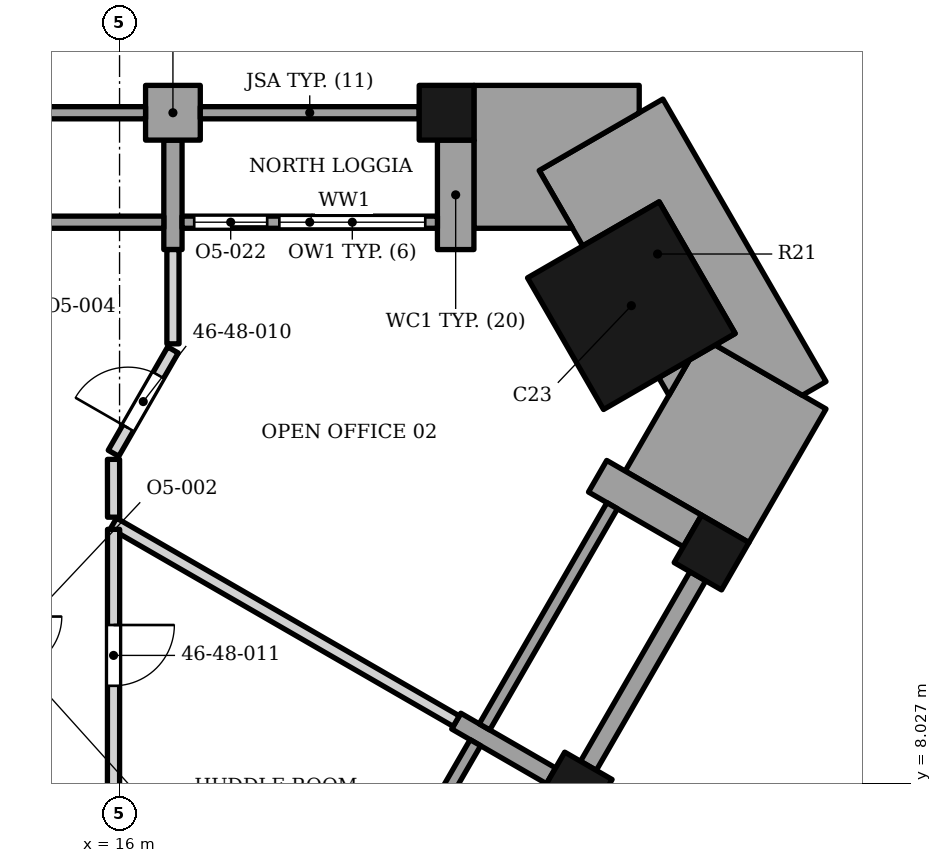
"""IFC4 building model, lengths in metres.
Left out: names, types, materials, properties, quantities, classifications, styles, units other than length and angle.
Written with IfcOpenShell. Run it as: python <this file> out.ifc"""

import sys

from ifc_helpers import new_model, si_unit, direction, frame, frame_2d, origin, origin_2d, place, context, subcontext, project, spatial, polyline, rectangle, outline, extrude, element, fill, save


model = new_model("IFC4")
c1 = context("Model", 3, precision=1e-05, world=origin(), true_north=direction((0.0, 1.0)))
c2 = subcontext(c1, "Body", "Model", "MODEL_VIEW")
j1 = project(units=[si_unit("LENGTHUNIT", "METRE"), si_unit("PLANEANGLEUNIT", "RADIAN")], contexts=[c1])
p1 = place(None, origin())
s1 = spatial("IfcSite", under=j1, at=p1, CompositionType="ELEMENT")
p2 = place(p1, origin())
s2 = spatial("IfcBuilding", under=s1, at=p2, CompositionType="ELEMENT")
p3 = place(p2, frame((0.0, 0.0, 196.4)))
s3 = spatial("IfcBuildingStorey", under=s2, at=p3, CompositionType="ELEMENT", Elevation=196.4)
p4 = place(p3, frame((24.417, 15.88, 0.0), z_axis=(0.0, 0.0, 1.0), x_axis=(-0.866025377604, -0.500000045345, 0.0)))
e1 = element("IfcColumn", 1, at=p4, inside=s3, PredefinedType="COLUMN", context=c2, shape_type="SweptSolid", body=[
    extrude(rectangle(XDim=2.5, YDim=2.5, at=origin_2d()), origin(), (0.0, 0.0, 1.0), 3.9),
])
for number, where, z_axis, x_axis in (
    (2, (23.486, 7.923, 0.0), (0.0, 0.0, 1.0), (0.5, 0.866, 0.0)),
    (3, (25.736, 11.82, 0.0), (0.0, 0.0, 1.0), (0.5, 0.866, 0.0)),
    (4, (21.378, 19.053, 0.0), (0.0, 0.0, 1.0), (-1.0, 0.0, 0.0)),
):
    element("IfcColumn", number, at=place(p3, frame(where, z_axis=z_axis, x_axis=x_axis)), inside=s3, PredefinedType="COLUMN", context=c2, shape_type="SweptSolid", body=[
        extrude(rectangle(XDim=0.9, YDim=0.9, at=origin_2d()), origin(), (0.0, 0.0, 1.0), 3.9),
    ])
p5 = place(p3, frame((23.096, 8.148, 0.0), z_axis=(0.0, 0.0, 1.0), x_axis=(-0.866047807691, 0.499961193289, 0.0)))
e5 = element("IfcWall", 5, at=p5, inside=s3, PredefinedType="SOLIDWALL", context=c2, shape_type="SweptSolid", body=[
    extrude(rectangle(XDim=1.8, YDim=0.3, at=frame_2d((0.9, 0.0))), origin(), (0.0, 0.0, 1.0), 2.95),
])
p6 = place(p3, frame((25.421, 12.175, 0.0), z_axis=(0.0, 0.0, 1.0), x_axis=(-0.865989075817, 0.500062916607, 0.0)))
e6 = element("IfcWall", 6, at=p6, inside=s3, PredefinedType="SOLIDWALL", context=c2, shape_type="SweptSolid", body=[
    extrude(rectangle(XDim=1.8, YDim=0.6, at=frame_2d((0.9, 0.0))), origin(), (0.0, 0.0, 1.0), 3.0),
])
p7 = place(p3, frame((19.752, 5.056, 0.0), z_axis=(0.0, 0.0, 1.0), x_axis=(0.500027713859, 0.866009402589, 0.0)))
e7 = element("IfcWall", 7, at=p7, inside=s3, PredefinedType="ELEMENTEDWALL", context=c2, shape_type="SweptSolid", body=[
    extrude(rectangle(XDim=4.2, YDim=0.2, at=frame_2d((2.1, 0.0))), origin(), (0.0, 0.0, 1.0), 2.95),
])
p8 = place(p3, frame((23.711, 8.313, 0.0), z_axis=(0.0, 0.0, 1.0), x_axis=(0.500012057535, 0.866018442252, 0.0)))
e8 = element("IfcWall", 8, at=p8, inside=s3, PredefinedType="SOLIDWALL", context=c2, shape_type="SweptSolid", body=[
    extrude(rectangle(XDim=3.6, YDim=0.3, at=frame_2d((1.8, 0.0))), origin(), (0.0, 0.0, 1.0), 3.0),
])
p9 = place(p3, frame((22.002, 8.953, 0.0), z_axis=(0.0, 0.0, 1.0), x_axis=(0.500002543286, 0.866023935413, 0.0)))
e9 = element("IfcWall", 9, at=p9, inside=s3, PredefinedType="ELEMENTEDWALL", context=c2, shape_type="SweptSolid", body=[
    extrude(rectangle(XDim=4.2, YDim=0.2, at=frame_2d((2.1, 0.0))), origin(), (0.0, 0.0, 1.0), 3.0),
])
p10 = place(p3, origin())
e10 = element("IfcWall", 10, at=p10, inside=s3, PredefinedType="SOLIDWALL", context=c2, shape_type="SweptSolid", body=[
    extrude(outline(polyline([(21.828, 16.802), (21.828, 18.603), (21.228, 18.603), (21.228, 16.802), (21.828, 16.802)])), origin(), (0.0, 0.0, 1.0), 3.0),
])
p11 = place(p3, origin())
e11 = element("IfcWall", 11, at=p11, inside=s3, PredefinedType="SOLIDWALL", context=c2, shape_type="SweptSolid", body=[
    extrude(outline(polyline([(17.328, 19.502), (16.428, 19.502), (16.428, 18.603), (17.328, 18.603), (17.328, 19.502)])), origin(), (0.0, 0.0, 1.0), 3.0),
])
p12 = place(p3, origin())
e12 = element("IfcWall", 12, at=p12, inside=s3, PredefinedType="SOLIDWALL", context=c2, shape_type="SweptSolid", body=[
    extrude(outline(polyline([(17.028, 18.603), (16.728, 18.603), (16.728, 16.802), (17.028, 16.802), (17.028, 18.603)])), origin(), (0.0, 0.0, 1.0), 3.0),
])
p13 = place(p3, frame((20.928, 19.052, 0.0), z_axis=(0.0, 0.0, 1.0), x_axis=(-1.0, 0.0, 0.0)))
e13 = element("IfcWall", 13, at=p13, inside=s3, PredefinedType="SOLIDWALL", context=c2, shape_type="SweptSolid", body=[
    extrude(rectangle(XDim=3.6, YDim=0.2, at=frame_2d((1.8, 0.0))), origin(), (0.0, 0.0, 1.0), 3.0),
])
p14 = place(p3, frame((21.228, 17.252, 0.0), z_axis=(0.0, 0.0, 1.0), x_axis=(-1.0, 0.0, 0.0)))
e14 = element("IfcWall", 14, at=p14, inside=s3, PredefinedType="ELEMENTEDWALL", context=c2, shape_type="SweptSolid", body=[
    extrude(rectangle(XDim=4.2, YDim=0.2, at=frame_2d((2.1, 0.0))), origin(), (0.0, 0.0, 1.0), 3.0),
])
p15 = place(p14, frame((0.2, 0.0, 0.45)))
e15 = element("IfcOpeningElement", 15, at=p15, cuts=e14, PredefinedType="OPENING", context=c2, shape_type="SweptSolid", body=[
    extrude(rectangle(XDim=2.4, YDim=2.25, at=frame_2d((1.2, 1.125))), frame((0.0, 0.11, 0.0), z_axis=(0.0, -1.0, 0.0), x_axis=(1.0, 0.0, 0.0)), (0.0, 0.0, 1.0), 0.22),
])
p16 = place(p14, frame((2.8, 0.0, 0.0)))
e16 = element("IfcOpeningElement", 16, at=p16, cuts=e14, PredefinedType="OPENING", context=c2, shape_type="SweptSolid", body=[
    extrude(rectangle(XDim=1.2, YDim=2.7, at=frame_2d((0.6, 1.35))), frame((0.0, 0.11, 0.0), z_axis=(0.0, -1.0, 0.0), x_axis=(1.0, 0.0, 0.0)), (0.0, 0.0, 1.0), 0.22),
])
p17 = place(p3, origin())
e17 = element("IfcWall", 17, at=p17, inside=s3, PredefinedType="SOLIDWALL", context=c2, shape_type="SweptSolid", body=[
    extrude(outline(polyline([(16.428, 19.153), (12.828, 19.153), (12.828, 19.052), (14.4, 19.052), (14.4, 18.953), (16.428, 18.953), (16.428, 19.153)])), origin(), (0.0, 0.0, 1.0), 3.0),
])
p18 = place(p3, frame((16.728, 17.252, 0.0), z_axis=(0.0, 0.0, 1.0), x_axis=(-1.0, 0.0, 0.0)))
e18 = element("IfcWall", 18, at=p18, inside=s3, PredefinedType="ELEMENTEDWALL", context=c2, shape_type="SweptSolid", body=[
    extrude(rectangle(XDim=4.2, YDim=0.2, at=frame_2d((2.1, 0.0))), origin(), (0.0, 0.0, 1.0), 3.0),
])
p19 = place(p3, origin())
e19 = element("IfcWall", 19, at=p19, inside=s3, PredefinedType="SOLIDWALL", context=c2, shape_type="SweptSolid", body=[
    extrude(outline(polyline([(25.37, 14.987), (24.315, 13.16), (26.351, 11.985), (27.619, 14.181), (25.797, 15.233), (25.37, 14.987)])), origin(), (0.0, 0.0, 1.0), 3.0),
])
p20 = place(p3, origin())
e20 = element("IfcWall", 20, at=p20, inside=s3, PredefinedType="SOLIDWALL", context=c2, shape_type="SweptSolid", body=[
    extrude(outline(polyline([(25.035, 14.406), (25.37, 14.987), (24.867, 14.697), (25.035, 14.406)])), origin(), (0.0, 0.0, 1.0), 3.0),
])
p21 = place(p3, origin())
e21 = element("IfcWall", 21, at=p21, inside=s3, PredefinedType="SOLIDWALL", context=c2, shape_type="SweptSolid", body=[
    extrude(outline(polyline([(22.901, 18.103), (23.617, 16.862), (24.875, 17.588), (26.125, 15.422), (25.797, 15.233), (27.229, 14.406), (27.619, 14.631), (24.936, 19.278), (22.901, 18.103)])), origin(), (0.0, 0.0, 1.0), 3.0),
])
p22 = place(p3, origin())
e22 = element("IfcWall", 22, at=p22, inside=s3, PredefinedType="SOLIDWALL", context=c2, shape_type="SweptSolid", body=[
    extrude(outline(polyline([(21.828, 18.603), (21.828, 17.153), (23.449, 17.153), (22.901, 18.103), (24.546, 19.052), (24.546, 19.502), (21.828, 19.502), (21.828, 18.603), (21.828, 18.603)])), origin(), (0.0, 0.0, 1.0), 3.0),
])
p23 = place(p3, frame((15.9, 12.3, 0.0), z_axis=(0.0, 0.0, 1.0), x_axis=(0.86615310705, -0.499778746194, 0.0)))
e23 = element("IfcWall", 23, at=p23, inside=s3, PredefinedType="PARTITIONING", context=c2, shape_type="SweptSolid", body=[
    extrude(rectangle(XDim=6.508, YDim=0.2, at=frame_2d((3.254, 0.0))), origin(), (0.0, 0.0, 1.0), 3.73),
])
p24 = place(p3, frame((15.9, 7.953, 0.0), z_axis=(0.0, 0.0, 1.0), x_axis=(0.000402229468, 0.999999919106, 0.0)))
e24 = element("IfcWall", 24, at=p24, inside=s3, PredefinedType="PARTITIONING", context=c2, shape_type="SweptSolid", body=[
    extrude(rectangle(XDim=4.249, YDim=0.2, at=frame_2d((2.125, 0.0))), origin(), (0.0, 0.0, 1.0), 2.95),
])
p25 = place(p24, frame((1.676, 0.0, 0.0)))
e25 = element("IfcOpeningElement", 25, at=p25, cuts=e24, PredefinedType="OPENING", context=c2, shape_type="SweptSolid", body=[
    extrude(rectangle(XDim=1.0, YDim=2.1, at=frame_2d((0.5, 1.05))), frame((0.0, 0.11, 0.0), z_axis=(0.0, -1.0, 0.0), x_axis=(1.0, 0.0, 0.0)), (0.0, 0.0, 1.0), 0.22),
])
p26 = place(p3, frame((15.901, 13.352, 0.0), z_axis=(0.0, 0.0, 1.0), x_axis=(0.001284025649, -0.999999175639, 0.0)))
e26 = element("IfcWall", 26, at=p26, inside=s3, PredefinedType="PARTITIONING", context=c2, shape_type="SweptSolid", body=[
    extrude(rectangle(XDim=0.951, YDim=0.2, at=frame_2d((0.475, 0.0))), origin(), (0.0, 0.0, 1.0), 3.73),
])
p27 = place(p3, frame((15.9, 13.452, 0.0), z_axis=(0.0, 0.0, 1.0), x_axis=(0.498590407305, 0.866837704385, 0.0)))
e27 = element("IfcWall", 27, at=p27, inside=s3, PredefinedType="PARTITIONING", context=c2, shape_type="SweptSolid", body=[
    extrude(rectangle(XDim=1.961, YDim=0.2, at=frame_2d((0.98, 0.0))), origin(), (0.0, 0.0, 1.0), 3.73),
])
p28 = place(p27, frame((0.481, 0.0, 0.0)))
e28 = element("IfcOpeningElement", 28, at=p28, cuts=e27, PredefinedType="OPENING", context=c2, shape_type="SweptSolid", body=[
    extrude(rectangle(XDim=1.0, YDim=2.1, at=frame_2d((0.5, 1.05))), frame((0.0, 0.11, 0.0), z_axis=(0.0, -1.0, 0.0), x_axis=(1.0, 0.0, 0.0)), (0.0, 0.0, 1.0), 0.22),
])
p29 = place(p3, frame((16.878, 15.252, 0.0), z_axis=(0.0, 0.0, 1.0), x_axis=(0.000157480313, 0.9999999876, 0.0)))
e29 = element("IfcWall", 29, at=p29, inside=s3, PredefinedType="PARTITIONING", context=c2, shape_type="SweptSolid", body=[
    extrude(rectangle(XDim=1.55, YDim=0.2, at=frame_2d((0.775, 0.0))), origin(), (0.0, 0.0, 1.0), 3.73),
])
p30 = place(p15, origin())
e30 = element("IfcWindow", 30, at=p30, inside=s3, PartitioningType="SINGLE_PANEL", PredefinedType="WINDOW", context=c2, shape_type="SweptSolid", body=[
    extrude(rectangle(XDim=2.4, YDim=2.25, at=frame_2d((1.2, 1.125))), frame((0.0, 0.03, 0.0), z_axis=(0.0, -1.0, 0.0), x_axis=(1.0, 0.0, 0.0)), (0.0, 0.0, 1.0), 0.06),
])
fill(e15, e30)
p31 = place(p16, origin())
e31 = element("IfcDoor", 31, at=p31, inside=s3, OperationType="SINGLE_SWING_LEFT", PredefinedType="DOOR", context=c2, shape_type="SweptSolid", body=[
    extrude(rectangle(XDim=1.2, YDim=2.7, at=frame_2d((0.6, 1.35))), frame((0.0, 0.025, 0.0), z_axis=(0.0, -1.0, 0.0), x_axis=(1.0, 0.0, 0.0)), (0.0, 0.0, 1.0), 0.05),
])
fill(e16, e31)
p32 = place(p28, origin())
e32 = element("IfcDoor", 32, at=p32, inside=s3, OperationType="SINGLE_SWING_LEFT", PredefinedType="DOOR", context=c2, shape_type="SweptSolid", body=[
    extrude(rectangle(XDim=1.0, YDim=2.1, at=frame_2d((0.5, 1.05))), frame((0.0, 0.025, 0.0), z_axis=(0.0, -1.0, 0.0), x_axis=(1.0, 0.0, 0.0)), (0.0, 0.0, 1.0), 0.05),
])
fill(e28, e32)
p33 = place(p25, origin())
e33 = element("IfcDoor", 33, at=p33, inside=s3, OperationType="SINGLE_SWING_RIGHT", PredefinedType="DOOR", context=c2, shape_type="SweptSolid", body=[
    extrude(rectangle(XDim=1.0, YDim=2.1, at=frame_2d((0.5, 1.05))), frame((0.0, 0.025, 0.0), z_axis=(0.0, -1.0, 0.0), x_axis=(1.0, 0.0, 0.0)), (0.0, 0.0, 1.0), 0.05),
])
fill(e25, e33)
save(model, sys.argv[1])
